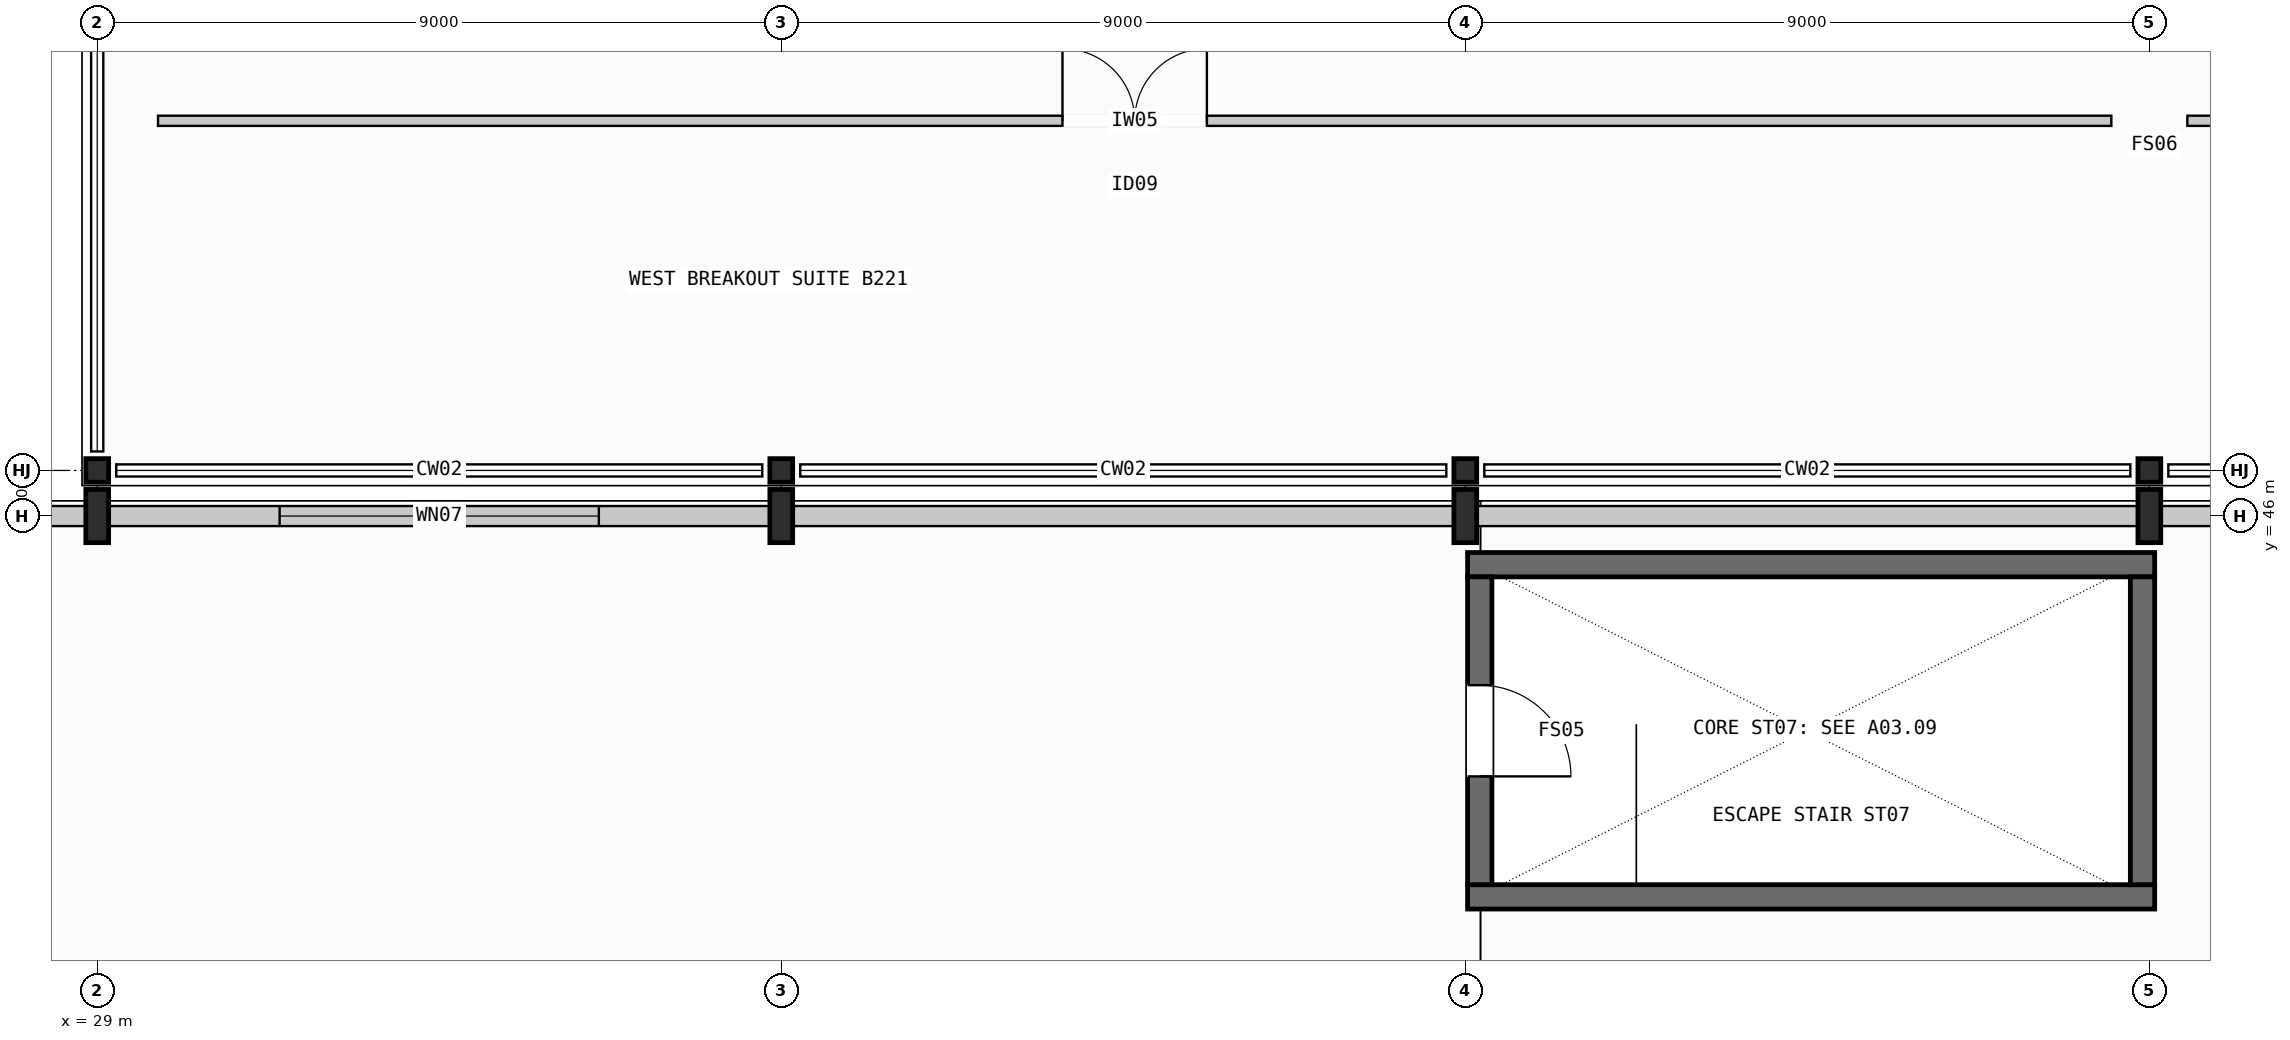
"""IFC4 building model, lengths in metres.
Left out: names, types, materials, properties, quantities, classifications, styles, units other than length and angle.
Written with IfcOpenShell. Run it as: python <this file> out.ifc"""

import sys

from ifc_helpers import new_model, si_unit, direction, frame, frame_2d, origin, origin_2d, place, context, subcontext, project, spatial, rectangle, i_section, extrude, element, fill, save


model = new_model("IFC4")
c1 = context("Model", 3, precision=1e-05, world=origin(), true_north=direction((0.0, 1.0)))
c2 = subcontext(c1, "Body", "Model", "MODEL_VIEW")
j1 = project(units=[si_unit("LENGTHUNIT", "METRE"), si_unit("PLANEANGLEUNIT", "RADIAN")], contexts=[c1])
p1 = place(None, origin())
s1 = spatial("IfcSite", under=j1, at=p1, CompositionType="ELEMENT")
p2 = place(p1, origin())
s2 = spatial("IfcBuilding", under=s1, at=p2, CompositionType="ELEMENT")
p3 = place(p2, frame((0.0, 0.0, 11.4)))
s3 = spatial("IfcBuildingStorey", under=s2, at=p3, CompositionType="ELEMENT", Elevation=11.4)
p4 = place(p3, frame((29.0, 46.0, 0.0), z_axis=(0.0, 0.0, 1.0), x_axis=(1.0, 0.0, 0.0)))
e1 = element("IfcColumn", 1, at=p4, inside=s3, PredefinedType="COLUMN", context=c2, shape_type="SweptSolid", body=[
    extrude(i_section(OverallWidth=0.3, OverallDepth=0.7, WebThickness=0.017, FlangeThickness=0.032, FilletRadius=0.027, at=origin_2d()), origin(), (0.0, 0.0, 1.0), 5.4),
])
p5 = place(p3, frame((29.0, 46.6, 0.0), z_axis=(0.0, 0.0, 1.0), x_axis=(1.0, 0.0, 0.0)))
e2 = element("IfcColumn", 2, at=p5, inside=s3, PredefinedType="COLUMN", context=c2, shape_type="SweptSolid", body=[
    extrude(i_section(OverallWidth=0.3, OverallDepth=0.31, WebThickness=0.009, FlangeThickness=0.015, FilletRadius=0.027, at=origin_2d()), origin(), (0.0, 0.0, 1.0), 5.4),
])
p6 = place(p3, frame((38.0, 46.0, 0.0), z_axis=(0.0, 0.0, 1.0), x_axis=(1.0, 0.0, 0.0)))
e3 = element("IfcColumn", 3, at=p6, inside=s3, PredefinedType="COLUMN", context=c2, shape_type="SweptSolid", body=[
    extrude(i_section(OverallWidth=0.3, OverallDepth=0.7, WebThickness=0.017, FlangeThickness=0.032, FilletRadius=0.027, at=origin_2d()), origin(), (0.0, 0.0, 1.0), 5.4),
])
p7 = place(p3, frame((38.0, 46.6, 0.0), z_axis=(0.0, 0.0, 1.0), x_axis=(1.0, 0.0, 0.0)))
e4 = element("IfcColumn", 4, at=p7, inside=s3, PredefinedType="COLUMN", context=c2, shape_type="SweptSolid", body=[
    extrude(i_section(OverallWidth=0.3, OverallDepth=0.31, WebThickness=0.009, FlangeThickness=0.015, FilletRadius=0.027, at=origin_2d()), origin(), (0.0, 0.0, 1.0), 5.4),
])
p8 = place(p3, frame((47.0, 46.0, 0.0), z_axis=(0.0, 0.0, 1.0), x_axis=(1.0, 0.0, 0.0)))
e5 = element("IfcColumn", 5, at=p8, inside=s3, PredefinedType="COLUMN", context=c2, shape_type="SweptSolid", body=[
    extrude(i_section(OverallWidth=0.3, OverallDepth=0.7, WebThickness=0.017, FlangeThickness=0.032, FilletRadius=0.027, at=origin_2d()), origin(), (0.0, 0.0, 1.0), 5.4),
])
p9 = place(p3, frame((47.0, 46.6, 0.0), z_axis=(0.0, 0.0, 1.0), x_axis=(1.0, 0.0, 0.0)))
e6 = element("IfcColumn", 6, at=p9, inside=s3, PredefinedType="COLUMN", context=c2, shape_type="SweptSolid", body=[
    extrude(i_section(OverallWidth=0.3, OverallDepth=0.31, WebThickness=0.009, FlangeThickness=0.015, FilletRadius=0.027, at=origin_2d()), origin(), (0.0, 0.0, 1.0), 5.4),
])
p10 = place(p3, frame((56.0, 46.0, 0.0), z_axis=(0.0, 0.0, 1.0), x_axis=(1.0, 0.0, 0.0)))
e7 = element("IfcColumn", 7, at=p10, inside=s3, PredefinedType="COLUMN", context=c2, shape_type="SweptSolid", body=[
    extrude(i_section(OverallWidth=0.3, OverallDepth=0.7, WebThickness=0.017, FlangeThickness=0.032, FilletRadius=0.027, at=origin_2d()), origin(), (0.0, 0.0, 1.0), 5.4),
])
p11 = place(p3, frame((56.0, 46.6, 0.0), z_axis=(0.0, 0.0, 1.0), x_axis=(1.0, 0.0, 0.0)))
e8 = element("IfcColumn", 8, at=p11, inside=s3, PredefinedType="COLUMN", context=c2, shape_type="SweptSolid", body=[
    extrude(i_section(OverallWidth=0.3, OverallDepth=0.31, WebThickness=0.009, FlangeThickness=0.015, FilletRadius=0.027, at=origin_2d()), origin(), (0.0, 0.0, 1.0), 5.4),
])
for number, where, z_axis, x_axis in (
    (9, (47.03, 40.99, 0.0), (0.0, 0.0, 1.0), (1.0, 0.0, 0.0)),
    (10, (47.03, 45.36, 0.0), (0.0, 0.0, 1.0), (1.0, 0.0, 0.0)),
):
    element("IfcWall", number, at=place(p3, frame(where, z_axis=z_axis, x_axis=x_axis)), inside=s3, PredefinedType="SHEAR", context=c2, shape_type="SweptSolid", body=[
        extrude(rectangle(XDim=9.04, YDim=0.32, at=frame_2d((4.52, 0.0))), origin(), (0.0, 0.0, 1.0), 4.2),
    ])
p12 = place(p3, frame((47.19, 41.15, 0.0), z_axis=(0.0, 0.0, 1.0), x_axis=(0.0, 1.0, 0.0)))
e11 = element("IfcWall", 11, at=p12, inside=s3, PredefinedType="SHEAR", context=c2, shape_type="SweptSolid", body=[
    extrude(rectangle(XDim=4.05, YDim=0.32, at=frame_2d((2.025, 0.0))), origin(), (0.0, 0.0, 1.0), 4.2),
])
p13 = place(p12, frame((1.425, 0.0, 0.0)))
e12 = element("IfcOpeningElement", 12, at=p13, cuts=e11, PredefinedType="OPENING", context=c2, shape_type="SweptSolid", body=[
    extrude(rectangle(XDim=1.2, YDim=2.2, at=frame_2d((0.6, 1.1))), frame((0.0, 0.17, 0.0), z_axis=(0.0, -1.0, 0.0), x_axis=(1.0, 0.0, 0.0)), (0.0, 0.0, 1.0), 0.34),
])
p14 = place(p3, frame((55.91, 41.15, 0.0), z_axis=(0.0, 0.0, 1.0), x_axis=(0.0, 1.0, 0.0)))
e13 = element("IfcWall", 13, at=p14, inside=s3, PredefinedType="SHEAR", context=c2, shape_type="SweptSolid", body=[
    extrude(rectangle(XDim=4.05, YDim=0.32, at=frame_2d((2.025, 0.0))), origin(), (0.0, 0.0, 1.0), 4.2),
])
p15 = place(p3, frame((20.146, 46.0, 0.0), z_axis=(0.0, 0.0, 1.0), x_axis=(1.0, 0.0, 0.0)))
e14 = element("IfcWall", 14, at=p15, inside=s3, PredefinedType="STANDARD", context=c2, shape_type="SweptSolid", body=[
    extrude(rectangle(XDim=8.708, YDim=0.264, at=frame_2d((4.354, 0.0))), origin(), (0.0, 0.0, 1.0), 4.438),
])
p16 = place(p15, frame((3.004, 0.0, 1.0)))
e15 = element("IfcOpeningElement", 15, at=p16, cuts=e14, PredefinedType="OPENING", context=c2, shape_type="SweptSolid", body=[
    extrude(rectangle(XDim=2.7, YDim=1.95, at=frame_2d((1.35, 0.975))), frame((0.0, 0.142, 0.0), z_axis=(0.0, -1.0, 0.0), x_axis=(1.0, 0.0, 0.0)), (0.0, 0.0, 1.0), 0.284),
])
p17 = place(p3, frame((29.146, 46.0, 0.0), z_axis=(0.0, 0.0, 1.0), x_axis=(1.0, 0.0, 0.0)))
e16 = element("IfcWall", 16, at=p17, inside=s3, PredefinedType="STANDARD", context=c2, shape_type="SweptSolid", body=[
    extrude(rectangle(XDim=8.708, YDim=0.264, at=frame_2d((4.354, 0.0))), origin(), (0.0, 0.0, 1.0), 4.438),
])
p18 = place(p17, frame((2.254, 0.0, 1.0)))
e17 = element("IfcOpeningElement", 17, at=p18, cuts=e16, PredefinedType="OPENING", context=c2, shape_type="SweptSolid", body=[
    extrude(rectangle(XDim=4.2, YDim=1.8, at=frame_2d((2.1, 0.9))), frame((0.0, 0.142, 0.0), z_axis=(0.0, -1.0, 0.0), x_axis=(1.0, 0.0, 0.0)), (0.0, 0.0, 1.0), 0.284),
])
for number, where, z_axis, x_axis in (
    (18, (38.146, 46.0, 0.0), (0.0, 0.0, 1.0), (1.0, 0.0, 0.0)),
    (19, (47.146, 46.0, 0.0), (0.0, 0.0, 1.0), (1.0, 0.0, 0.0)),
    (20, (56.146, 46.0, 0.0), (0.0, 0.0, 1.0), (1.0, 0.0, 0.0)),
):
    element("IfcWall", number, at=place(p3, frame(where, z_axis=z_axis, x_axis=x_axis)), inside=s3, PredefinedType="STANDARD", context=c2, shape_type="SweptSolid", body=[
        extrude(rectangle(XDim=8.708, YDim=0.264, at=frame_2d((4.354, 0.0))), origin(), (0.0, 0.0, 1.0), 4.438),
    ])
p19 = place(p3, frame((29.8, 51.2, 0.0), z_axis=(0.0, 0.0, 1.0), x_axis=(1.0, 0.0, 0.0)))
e21 = element("IfcWall", 21, at=p19, inside=s3, PredefinedType="PARTITIONING", context=c2, shape_type="SweptSolid", body=[
    extrude(rectangle(XDim=25.7, YDim=0.134, at=frame_2d((12.85, 0.0))), origin(), (0.0, 0.0, 1.0), 4.4),
])
p20 = place(p19, frame((11.9, 0.0, 0.0)))
e22 = element("IfcOpeningElement", 22, at=p20, cuts=e21, PredefinedType="OPENING", context=c2, shape_type="SweptSolid", body=[
    extrude(rectangle(XDim=1.9, YDim=2.26, at=frame_2d((0.95, 1.13))), frame((0.0, 0.077, 0.0), z_axis=(0.0, -1.0, 0.0), x_axis=(1.0, 0.0, 0.0)), (0.0, 0.0, 1.0), 0.154),
])
p21 = place(p3, frame((56.5, 51.2, 0.0), z_axis=(0.0, 0.0, 1.0), x_axis=(1.0, 0.0, 0.0)))
e23 = element("IfcWall", 23, at=p21, inside=s3, PredefinedType="PARTITIONING", context=c2, shape_type="SweptSolid", body=[
    extrude(rectangle(XDim=25.7, YDim=0.134, at=frame_2d((12.85, 0.0))), origin(), (0.0, 0.0, 1.0), 4.4),
])
p22 = place(p21, frame((11.8, 0.0, 0.0)))
e24 = element("IfcOpeningElement", 24, at=p22, cuts=e23, PredefinedType="OPENING", context=c2, shape_type="SweptSolid", body=[
    extrude(rectangle(XDim=2.1, YDim=2.3, at=frame_2d((1.05, 1.15))), frame((0.0, 0.077, 0.0), z_axis=(0.0, -1.0, 0.0), x_axis=(1.0, 0.0, 0.0)), (0.0, 0.0, 1.0), 0.154),
])
p23 = place(p18, origin())
e25 = element("IfcWindow", 25, at=p23, inside=s3, PartitioningType="SINGLE_PANEL", PredefinedType="WINDOW", context=c2, shape_type="SweptSolid", body=[
    extrude(rectangle(XDim=4.2, YDim=1.8, at=frame_2d((2.1, 0.9))), frame((0.0, 0.03, 0.0), z_axis=(0.0, -1.0, 0.0), x_axis=(1.0, 0.0, 0.0)), (0.0, 0.0, 1.0), 0.06),
])
fill(e17, e25)
p24 = place(p13, frame((1.2, 0.0, 0.0), z_axis=(0.0, 0.0, 1.0), x_axis=(-1.0, 0.0, 0.0)))
e26 = element("IfcDoor", 26, at=p24, inside=s3, OperationType="SINGLE_SWING_RIGHT", PredefinedType="DOOR", context=c2, shape_type="SweptSolid", body=[
    extrude(rectangle(XDim=1.2, YDim=2.2, at=frame_2d((0.6, 1.1))), frame((0.0, 0.025, 0.0), z_axis=(0.0, -1.0, 0.0), x_axis=(1.0, 0.0, 0.0)), (0.0, 0.0, 1.0), 0.05),
])
fill(e12, e26)
p25 = place(p20, origin())
e27 = element("IfcDoor", 27, at=p25, inside=s3, OperationType="DOUBLE_DOOR_SINGLE_SWING", PredefinedType="DOOR", context=c2, shape_type="SweptSolid", body=[
    extrude(rectangle(XDim=1.9, YDim=2.26, at=frame_2d((0.95, 1.13))), frame((0.0, 0.025, 0.0), z_axis=(0.0, -1.0, 0.0), x_axis=(1.0, 0.0, 0.0)), (0.0, 0.0, 1.0), 0.05),
])
fill(e22, e27)
save(model, sys.argv[1])
